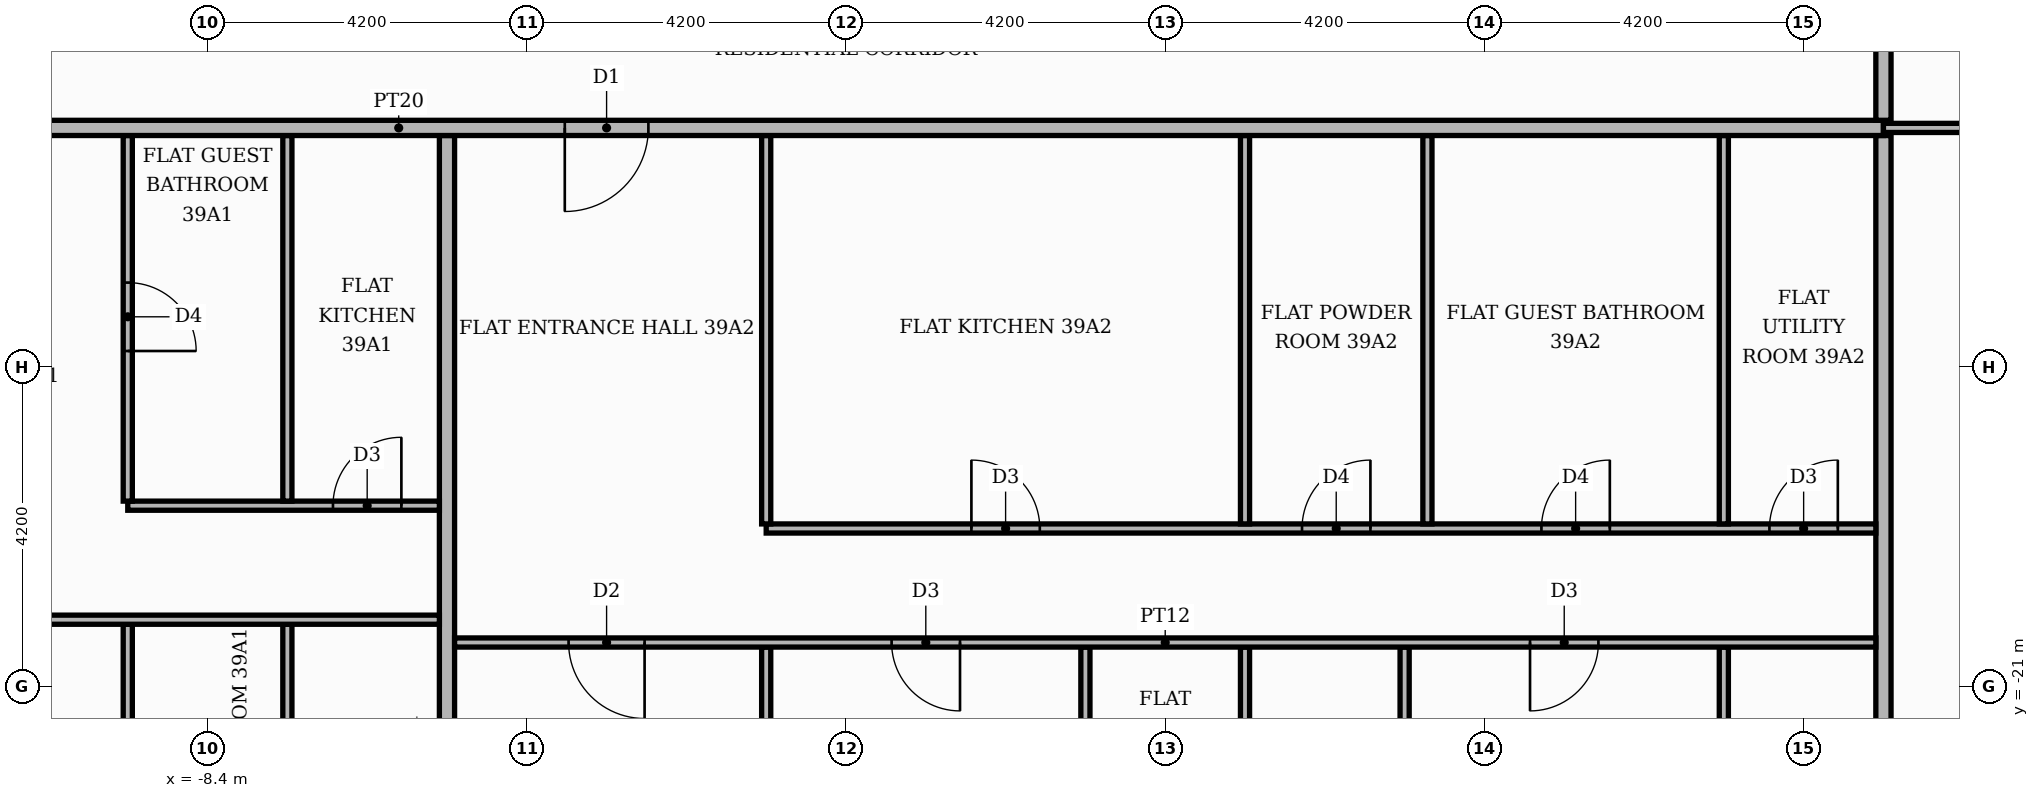
"""IFC4 building model, lengths in metres.
Left out: names, types, materials, properties, quantities, classifications, styles, units other than length and angle.
Written with IfcOpenShell. Run it as: python <this file> out.ifc"""

import sys

from ifc_helpers import new_model, si_unit, direction, frame, frame_2d, origin, place, context, subcontext, project, spatial, rectangle, extrude, element, fill, save


model = new_model("IFC4")
c1 = context("Model", 3, precision=1e-05, world=origin(), true_north=direction((0.0, 1.0)))
c2 = subcontext(c1, "Body", "Model", "MODEL_VIEW")
j1 = project(units=[si_unit("LENGTHUNIT", "METRE"), si_unit("PLANEANGLEUNIT", "RADIAN")], contexts=[c1])
p1 = place(None, origin())
s1 = spatial("IfcSite", under=j1, at=p1, CompositionType="ELEMENT")
p2 = place(p1, origin())
s2 = spatial("IfcBuilding", under=s1, at=p2, CompositionType="ELEMENT")
p3 = place(p2, frame((0.0, 0.0, 165.0)))
s3 = spatial("IfcBuildingStorey", under=s2, at=p3, CompositionType="ELEMENT", Elevation=165.0)
p4 = place(p3, frame((-9.45, -25.42, 0.0), z_axis=(0.0, 0.0, 1.0), x_axis=(0.0, 1.0, 0.0)))
e1 = element("IfcWall", 1, at=p4, inside=s3, PredefinedType="PARTITIONING", context=c2, shape_type="SweptSolid", body=[
    extrude(rectangle(XDim=5.24, YDim=0.12, at=frame_2d((2.62, 0.0))), origin(), (0.0, 0.0, 1.0), 3.48),
])
p5 = place(p4, frame((2.05, 0.0, 0.0)))
e2 = element("IfcOpeningElement", 2, at=p5, cuts=e1, PredefinedType="OPENING", context=c2, shape_type="SweptSolid", body=[
    extrude(rectangle(XDim=0.9, YDim=2.1, at=frame_2d((0.45, 1.05))), frame((0.0, 0.07, 0.0), z_axis=(0.0, -1.0, 0.0), x_axis=(1.0, 0.0, 0.0)), (0.0, 0.0, 1.0), 0.14),
])
p6 = place(p3, frame((-7.35, -25.42, 0.0), z_axis=(0.0, 0.0, 1.0), x_axis=(0.0, 1.0, 0.0)))
e3 = element("IfcWall", 3, at=p6, inside=s3, PredefinedType="PARTITIONING", context=c2, shape_type="SweptSolid", body=[
    extrude(rectangle(XDim=5.24, YDim=0.12, at=frame_2d((2.62, 0.0))), origin(), (0.0, 0.0, 1.0), 3.48),
])
p7 = place(p6, frame((2.05, 0.0, 0.0)))
e4 = element("IfcOpeningElement", 4, at=p7, cuts=e3, PredefinedType="OPENING", context=c2, shape_type="SweptSolid", body=[
    extrude(rectangle(XDim=0.9, YDim=2.1, at=frame_2d((0.45, 1.05))), frame((0.0, 0.07, 0.0), z_axis=(0.0, -1.0, 0.0), x_axis=(1.0, 0.0, 0.0)), (0.0, 0.0, 1.0), 0.14),
])
p8 = place(p3, frame((-5.25, -25.42, 0.0), z_axis=(0.0, 0.0, 1.0), x_axis=(0.0, 1.0, 0.0)))
e5 = element("IfcWall", 5, at=p8, inside=s3, PredefinedType="PARTITIONING", context=c2, shape_type="SweptSolid", body=[
    extrude(rectangle(XDim=11.67, YDim=0.2, at=frame_2d((5.835, 0.0))), origin(), (0.0, 0.0, 1.0), 3.48),
])
p9 = place(p3, frame((-1.05, -25.42, 0.0), z_axis=(0.0, 0.0, 1.0), x_axis=(0.0, 1.0, 0.0)))
e6 = element("IfcWall", 6, at=p9, inside=s3, PredefinedType="PARTITIONING", context=c2, shape_type="SweptSolid", body=[
    extrude(rectangle(XDim=4.94, YDim=0.12, at=frame_2d((2.47, 0.0))), origin(), (0.0, 0.0, 1.0), 3.48),
])
p10 = place(p3, frame((3.15, -25.42, 0.0), z_axis=(0.0, 0.0, 1.0), x_axis=(0.0, 1.0, 0.0)))
e7 = element("IfcWall", 7, at=p10, inside=s3, PredefinedType="PARTITIONING", context=c2, shape_type="SweptSolid", body=[
    extrude(rectangle(XDim=4.94, YDim=0.12, at=frame_2d((2.47, 0.0))), origin(), (0.0, 0.0, 1.0), 3.48),
])
p11 = place(p10, frame((1.9, 0.0, 0.0)))
e8 = element("IfcOpeningElement", 8, at=p11, cuts=e7, PredefinedType="OPENING", context=c2, shape_type="SweptSolid", body=[
    extrude(rectangle(XDim=0.9, YDim=2.1, at=frame_2d((0.45, 1.05))), frame((0.0, 0.07, 0.0), z_axis=(0.0, -1.0, 0.0), x_axis=(1.0, 0.0, 0.0)), (0.0, 0.0, 1.0), 0.14),
])
p12 = place(p3, frame((5.25, -25.42, 0.0), z_axis=(0.0, 0.0, 1.0), x_axis=(0.0, 1.0, 0.0)))
e9 = element("IfcWall", 9, at=p12, inside=s3, PredefinedType="PARTITIONING", context=c2, shape_type="SweptSolid", body=[
    extrude(rectangle(XDim=4.94, YDim=0.12, at=frame_2d((2.47, 0.0))), origin(), (0.0, 0.0, 1.0), 3.48),
])
p13 = place(p12, frame((1.9, 0.0, 0.0)))
e10 = element("IfcOpeningElement", 10, at=p13, cuts=e9, PredefinedType="OPENING", context=c2, shape_type="SweptSolid", body=[
    extrude(rectangle(XDim=0.9, YDim=2.1, at=frame_2d((0.45, 1.05))), frame((0.0, 0.07, 0.0), z_axis=(0.0, -1.0, 0.0), x_axis=(1.0, 0.0, 0.0)), (0.0, 0.0, 1.0), 0.14),
])
p14 = place(p3, frame((7.35, -25.42, 0.0), z_axis=(0.0, 0.0, 1.0), x_axis=(0.0, 1.0, 0.0)))
e11 = element("IfcWall", 11, at=p14, inside=s3, PredefinedType="PARTITIONING", context=c2, shape_type="SweptSolid", body=[
    extrude(rectangle(XDim=4.94, YDim=0.12, at=frame_2d((2.47, 0.0))), origin(), (0.0, 0.0, 1.0), 3.48),
])
p15 = place(p3, frame((11.55, -25.42, 0.0), z_axis=(0.0, 0.0, 1.0), x_axis=(0.0, 1.0, 0.0)))
e12 = element("IfcWall", 12, at=p15, inside=s3, PredefinedType="PARTITIONING", context=c2, shape_type="SweptSolid", body=[
    extrude(rectangle(XDim=4.94, YDim=0.12, at=frame_2d((2.47, 0.0))), origin(), (0.0, 0.0, 1.0), 3.48),
])
p16 = place(p15, frame((1.9, 0.0, 0.0)))
e13 = element("IfcOpeningElement", 13, at=p16, cuts=e12, PredefinedType="OPENING", context=c2, shape_type="SweptSolid", body=[
    extrude(rectangle(XDim=0.9, YDim=2.1, at=frame_2d((0.45, 1.05))), frame((0.0, 0.07, 0.0), z_axis=(0.0, -1.0, 0.0), x_axis=(1.0, 0.0, 0.0)), (0.0, 0.0, 1.0), 0.14),
])
p17 = place(p3, frame((13.65, -25.42, 0.0), z_axis=(0.0, 0.0, 1.0), x_axis=(0.0, 1.0, 0.0)))
e14 = element("IfcWall", 14, at=p17, inside=s3, PredefinedType="PARTITIONING", context=c2, shape_type="SweptSolid", body=[
    extrude(rectangle(XDim=11.67, YDim=0.2, at=frame_2d((5.835, 0.0))), origin(), (0.0, 0.0, 1.0), 3.48),
])
p18 = place(p3, frame((-5.15, -20.42, 0.0), z_axis=(0.0, 0.0, 1.0), x_axis=(1.0, 0.0, 0.0)))
e15 = element("IfcWall", 15, at=p18, inside=s3, PredefinedType="PARTITIONING", context=c2, shape_type="SweptSolid", body=[
    extrude(rectangle(XDim=18.7, YDim=0.12, at=frame_2d((9.35, 0.0))), origin(), (0.0, 0.0, 1.0), 3.48),
])
p19 = place(p18, frame((1.5, 0.0, 0.0)))
e16 = element("IfcOpeningElement", 16, at=p19, cuts=e15, PredefinedType="OPENING", context=c2, shape_type="SweptSolid", body=[
    extrude(rectangle(XDim=1.0, YDim=2.1, at=frame_2d((0.5, 1.05))), frame((0.0, 0.07, 0.0), z_axis=(0.0, -1.0, 0.0), x_axis=(1.0, 0.0, 0.0)), (0.0, 0.0, 1.0), 0.14),
])
p20 = place(p18, frame((5.75, 0.0, 0.0)))
e17 = element("IfcOpeningElement", 17, at=p20, cuts=e15, PredefinedType="OPENING", context=c2, shape_type="SweptSolid", body=[
    extrude(rectangle(XDim=0.9, YDim=2.1, at=frame_2d((0.45, 1.05))), frame((0.0, 0.07, 0.0), z_axis=(0.0, -1.0, 0.0), x_axis=(1.0, 0.0, 0.0)), (0.0, 0.0, 1.0), 0.14),
])
p21 = place(p18, frame((14.15, 0.0, 0.0)))
e18 = element("IfcOpeningElement", 18, at=p21, cuts=e15, PredefinedType="OPENING", context=c2, shape_type="SweptSolid", body=[
    extrude(rectangle(XDim=0.9, YDim=2.1, at=frame_2d((0.45, 1.05))), frame((0.0, 0.07, 0.0), z_axis=(0.0, -1.0, 0.0), x_axis=(1.0, 0.0, 0.0)), (0.0, 0.0, 1.0), 0.14),
])
p22 = place(p3, frame((-25.42, -20.12, 0.0), z_axis=(0.0, 0.0, 1.0), x_axis=(1.0, 0.0, 0.0)))
e19 = element("IfcWall", 19, at=p22, inside=s3, PredefinedType="PARTITIONING", context=c2, shape_type="SweptSolid", body=[
    extrude(rectangle(XDim=20.07, YDim=0.12, at=frame_2d((10.035, 0.0))), origin(), (0.0, 0.0, 1.0), 3.48),
])
p23 = place(p22, frame((10.22, 0.0, 0.0)))
e20 = element("IfcOpeningElement", 20, at=p23, cuts=e19, PredefinedType="OPENING", context=c2, shape_type="SweptSolid", body=[
    extrude(rectangle(XDim=1.0, YDim=2.1, at=frame_2d((0.5, 1.05))), frame((0.0, 0.07, 0.0), z_axis=(0.0, -1.0, 0.0), x_axis=(1.0, 0.0, 0.0)), (0.0, 0.0, 1.0), 0.14),
])
p24 = place(p22, frame((13.42, 0.0, 0.0)))
e21 = element("IfcOpeningElement", 21, at=p24, cuts=e19, PredefinedType="OPENING", context=c2, shape_type="SweptSolid", body=[
    extrude(rectangle(XDim=0.9, YDim=2.1, at=frame_2d((0.45, 1.05))), frame((0.0, 0.07, 0.0), z_axis=(0.0, -1.0, 0.0), x_axis=(1.0, 0.0, 0.0)), (0.0, 0.0, 1.0), 0.14),
])
p25 = place(p3, frame((-1.05, -18.92, 0.0), z_axis=(0.0, 0.0, 1.0), x_axis=(1.0, 0.0, 0.0)))
e22 = element("IfcWall", 22, at=p25, inside=s3, PredefinedType="PARTITIONING", context=c2, shape_type="SweptSolid", body=[
    extrude(rectangle(XDim=14.6, YDim=0.12, at=frame_2d((7.3, 0.0))), origin(), (0.0, 0.0, 1.0), 3.48),
])
p26 = place(p25, frame((2.7, 0.0, 0.0)))
e23 = element("IfcOpeningElement", 23, at=p26, cuts=e22, PredefinedType="OPENING", context=c2, shape_type="SweptSolid", body=[
    extrude(rectangle(XDim=0.9, YDim=2.1, at=frame_2d((0.45, 1.05))), frame((0.0, 0.07, 0.0), z_axis=(0.0, -1.0, 0.0), x_axis=(1.0, 0.0, 0.0)), (0.0, 0.0, 1.0), 0.14),
])
p27 = place(p25, frame((7.05, 0.0, 0.0)))
e24 = element("IfcOpeningElement", 24, at=p27, cuts=e22, PredefinedType="OPENING", context=c2, shape_type="SweptSolid", body=[
    extrude(rectangle(XDim=0.9, YDim=2.1, at=frame_2d((0.45, 1.05))), frame((0.0, 0.07, 0.0), z_axis=(0.0, -1.0, 0.0), x_axis=(1.0, 0.0, 0.0)), (0.0, 0.0, 1.0), 0.14),
])
p28 = place(p25, frame((10.2, 0.0, 0.0)))
e25 = element("IfcOpeningElement", 25, at=p28, cuts=e22, PredefinedType="OPENING", context=c2, shape_type="SweptSolid", body=[
    extrude(rectangle(XDim=0.9, YDim=2.1, at=frame_2d((0.45, 1.05))), frame((0.0, 0.07, 0.0), z_axis=(0.0, -1.0, 0.0), x_axis=(1.0, 0.0, 0.0)), (0.0, 0.0, 1.0), 0.14),
])
p29 = place(p25, frame((13.2, 0.0, 0.0)))
e26 = element("IfcOpeningElement", 26, at=p29, cuts=e22, PredefinedType="OPENING", context=c2, shape_type="SweptSolid", body=[
    extrude(rectangle(XDim=0.9, YDim=2.1, at=frame_2d((0.45, 1.05))), frame((0.0, 0.07, 0.0), z_axis=(0.0, -1.0, 0.0), x_axis=(1.0, 0.0, 0.0)), (0.0, 0.0, 1.0), 0.14),
])
for number, where, z_axis, x_axis in (
    (27, (-1.05, -18.86, 0.0), (0.0, 0.0, 1.0), (0.0, 1.0, 0.0)),
    (28, (5.25, -18.86, 0.0), (0.0, 0.0, 1.0), (0.0, 1.0, 0.0)),
    (29, (7.65, -18.86, 0.0), (0.0, 0.0, 1.0), (0.0, 1.0, 0.0)),
    (30, (11.55, -18.86, 0.0), (0.0, 0.0, 1.0), (0.0, 1.0, 0.0)),
):
    element("IfcWall", number, at=place(p3, frame(where, z_axis=z_axis, x_axis=x_axis)), inside=s3, PredefinedType="PARTITIONING", context=c2, shape_type="SweptSolid", body=[
        extrude(rectangle(XDim=5.11, YDim=0.12, at=frame_2d((2.555, 0.0))), origin(), (0.0, 0.0, 1.0), 3.48),
    ])
p30 = place(p3, frame((-9.45, -18.62, 0.0), z_axis=(0.0, 0.0, 1.0), x_axis=(1.0, 0.0, 0.0)))
e31 = element("IfcWall", 31, at=p30, inside=s3, PredefinedType="PARTITIONING", context=c2, shape_type="SweptSolid", body=[
    extrude(rectangle(XDim=4.1, YDim=0.12, at=frame_2d((2.05, 0.0))), origin(), (0.0, 0.0, 1.0), 3.48),
])
p31 = place(p30, frame((2.7, 0.0, 0.0)))
e32 = element("IfcOpeningElement", 32, at=p31, cuts=e31, PredefinedType="OPENING", context=c2, shape_type="SweptSolid", body=[
    extrude(rectangle(XDim=0.9, YDim=2.1, at=frame_2d((0.45, 1.05))), frame((0.0, 0.07, 0.0), z_axis=(0.0, -1.0, 0.0), x_axis=(1.0, 0.0, 0.0)), (0.0, 0.0, 1.0), 0.14),
])
p32 = place(p3, frame((-9.45, -18.56, 0.0), z_axis=(0.0, 0.0, 1.0), x_axis=(0.0, 1.0, 0.0)))
e33 = element("IfcWall", 33, at=p32, inside=s3, PredefinedType="PARTITIONING", context=c2, shape_type="SweptSolid", body=[
    extrude(rectangle(XDim=4.81, YDim=0.12, at=frame_2d((2.405, 0.0))), origin(), (0.0, 0.0, 1.0), 3.48),
])
p33 = place(p32, frame((1.975, 0.0, 0.0)))
e34 = element("IfcOpeningElement", 34, at=p33, cuts=e33, PredefinedType="OPENING", context=c2, shape_type="SweptSolid", body=[
    extrude(rectangle(XDim=0.9, YDim=2.1, at=frame_2d((0.45, 1.05))), frame((0.0, 0.07, 0.0), z_axis=(0.0, -1.0, 0.0), x_axis=(1.0, 0.0, 0.0)), (0.0, 0.0, 1.0), 0.14),
])
p34 = place(p3, frame((-7.35, -18.56, 0.0), z_axis=(0.0, 0.0, 1.0), x_axis=(0.0, 1.0, 0.0)))
e35 = element("IfcWall", 35, at=p34, inside=s3, PredefinedType="PARTITIONING", context=c2, shape_type="SweptSolid", body=[
    extrude(rectangle(XDim=4.81, YDim=0.12, at=frame_2d((2.405, 0.0))), origin(), (0.0, 0.0, 1.0), 3.48),
])
p35 = place(p3, frame((-25.42, -13.65, 0.0), z_axis=(0.0, 0.0, 1.0), x_axis=(1.0, 0.0, 0.0)))
e36 = element("IfcWall", 36, at=p35, inside=s3, PredefinedType="PARTITIONING", context=c2, shape_type="SweptSolid", body=[
    extrude(rectangle(XDim=39.07, YDim=0.2, at=frame_2d((19.535, 0.0))), origin(), (0.0, 0.0, 1.0), 3.48),
])
p36 = place(p35, frame((13.32, 0.0, 0.0)))
e37 = element("IfcOpeningElement", 37, at=p36, cuts=e36, PredefinedType="OPENING", context=c2, shape_type="SweptSolid", body=[
    extrude(rectangle(XDim=1.1, YDim=2.4, at=frame_2d((0.55, 1.2))), frame((0.0, 0.11, 0.0), z_axis=(0.0, -1.0, 0.0), x_axis=(1.0, 0.0, 0.0)), (0.0, 0.0, 1.0), 0.22),
])
p37 = place(p35, frame((21.72, 0.0, 0.0)))
e38 = element("IfcOpeningElement", 38, at=p37, cuts=e36, PredefinedType="OPENING", context=c2, shape_type="SweptSolid", body=[
    extrude(rectangle(XDim=1.1, YDim=2.4, at=frame_2d((0.55, 1.2))), frame((0.0, 0.11, 0.0), z_axis=(0.0, -1.0, 0.0), x_axis=(1.0, 0.0, 0.0)), (0.0, 0.0, 1.0), 0.22),
])
p38 = place(p3, frame((13.65, -13.65, 0.0), z_axis=(0.0, 0.0, 1.0), x_axis=(1.0, 0.0, 0.0)))
e39 = element("IfcWall", 39, at=p38, inside=s3, PredefinedType="PARTITIONING", context=c2, shape_type="SweptSolid", body=[
    extrude(rectangle(XDim=7.07, YDim=0.12, at=frame_2d((3.535, 0.0))), origin(), (0.0, 0.0, 1.0), 3.48),
])
p39 = place(p38, frame((3.085, 0.0, 0.0)))
e40 = element("IfcOpeningElement", 40, at=p39, cuts=e39, PredefinedType="OPENING", context=c2, shape_type="SweptSolid", body=[
    extrude(rectangle(XDim=0.9, YDim=2.1, at=frame_2d((0.45, 1.05))), frame((0.0, 0.07, 0.0), z_axis=(0.0, -1.0, 0.0), x_axis=(1.0, 0.0, 0.0)), (0.0, 0.0, 1.0), 0.14),
])
p40 = place(p3, frame((13.65, -13.55, 0.0), z_axis=(0.0, 0.0, 1.0), x_axis=(0.0, 1.0, 0.0)))
e41 = element("IfcWall", 41, at=p40, inside=s3, PredefinedType="PARTITIONING", context=c2, shape_type="SweptSolid", body=[
    extrude(rectangle(XDim=2.45, YDim=0.2, at=frame_2d((1.225, 0.0))), origin(), (0.0, 0.0, 1.0), 3.48),
])
p41 = place(p33, frame((0.9, 0.0, 0.0), z_axis=(0.0, 0.0, 1.0), x_axis=(-1.0, 0.0, 0.0)))
e42 = element("IfcDoor", 42, at=p41, inside=s3, OperationType="SINGLE_SWING_LEFT", PredefinedType="DOOR", context=c2, shape_type="SweptSolid", body=[
    extrude(rectangle(XDim=0.9, YDim=2.1, at=frame_2d((0.45, 1.05))), frame((0.0, 0.025, 0.0), z_axis=(0.0, -1.0, 0.0), x_axis=(1.0, 0.0, 0.0)), (0.0, 0.0, 1.0), 0.05),
])
fill(e34, e42)
p42 = place(p31, origin())
e43 = element("IfcDoor", 43, at=p42, inside=s3, OperationType="SINGLE_SWING_RIGHT", PredefinedType="DOOR", context=c2, shape_type="SweptSolid", body=[
    extrude(rectangle(XDim=0.9, YDim=2.1, at=frame_2d((0.45, 1.05))), frame((0.0, 0.025, 0.0), z_axis=(0.0, -1.0, 0.0), x_axis=(1.0, 0.0, 0.0)), (0.0, 0.0, 1.0), 0.05),
])
fill(e32, e43)
p43 = place(p37, frame((1.1, 0.0, 0.0), z_axis=(0.0, 0.0, 1.0), x_axis=(-1.0, 0.0, 0.0)))
e44 = element("IfcDoor", 44, at=p43, inside=s3, OperationType="SINGLE_SWING_LEFT", PredefinedType="DOOR", context=c2, shape_type="SweptSolid", body=[
    extrude(rectangle(XDim=1.1, YDim=2.4, at=frame_2d((0.55, 1.2))), frame((0.0, 0.025, 0.0), z_axis=(0.0, -1.0, 0.0), x_axis=(1.0, 0.0, 0.0)), (0.0, 0.0, 1.0), 0.05),
])
fill(e38, e44)
p44 = place(p26, origin())
e45 = element("IfcDoor", 45, at=p44, inside=s3, OperationType="SINGLE_SWING_LEFT", PredefinedType="DOOR", context=c2, shape_type="SweptSolid", body=[
    extrude(rectangle(XDim=0.9, YDim=2.1, at=frame_2d((0.45, 1.05))), frame((0.0, 0.025, 0.0), z_axis=(0.0, -1.0, 0.0), x_axis=(1.0, 0.0, 0.0)), (0.0, 0.0, 1.0), 0.05),
])
fill(e23, e45)
p45 = place(p27, origin())
e46 = element("IfcDoor", 46, at=p45, inside=s3, OperationType="SINGLE_SWING_RIGHT", PredefinedType="DOOR", context=c2, shape_type="SweptSolid", body=[
    extrude(rectangle(XDim=0.9, YDim=2.1, at=frame_2d((0.45, 1.05))), frame((0.0, 0.025, 0.0), z_axis=(0.0, -1.0, 0.0), x_axis=(1.0, 0.0, 0.0)), (0.0, 0.0, 1.0), 0.05),
])
fill(e24, e46)
p46 = place(p28, origin())
e47 = element("IfcDoor", 47, at=p46, inside=s3, OperationType="SINGLE_SWING_RIGHT", PredefinedType="DOOR", context=c2, shape_type="SweptSolid", body=[
    extrude(rectangle(XDim=0.9, YDim=2.1, at=frame_2d((0.45, 1.05))), frame((0.0, 0.025, 0.0), z_axis=(0.0, -1.0, 0.0), x_axis=(1.0, 0.0, 0.0)), (0.0, 0.0, 1.0), 0.05),
])
fill(e25, e47)
p47 = place(p29, origin())
e48 = element("IfcDoor", 48, at=p47, inside=s3, OperationType="SINGLE_SWING_RIGHT", PredefinedType="DOOR", context=c2, shape_type="SweptSolid", body=[
    extrude(rectangle(XDim=0.9, YDim=2.1, at=frame_2d((0.45, 1.05))), frame((0.0, 0.025, 0.0), z_axis=(0.0, -1.0, 0.0), x_axis=(1.0, 0.0, 0.0)), (0.0, 0.0, 1.0), 0.05),
])
fill(e26, e48)
p48 = place(p19, frame((1.0, 0.0, 0.0), z_axis=(0.0, 0.0, 1.0), x_axis=(-1.0, 0.0, 0.0)))
e49 = element("IfcDoor", 49, at=p48, inside=s3, OperationType="SINGLE_SWING_RIGHT", PredefinedType="DOOR", context=c2, shape_type="SweptSolid", body=[
    extrude(rectangle(XDim=1.0, YDim=2.1, at=frame_2d((0.5, 1.05))), frame((0.0, 0.025, 0.0), z_axis=(0.0, -1.0, 0.0), x_axis=(1.0, 0.0, 0.0)), (0.0, 0.0, 1.0), 0.05),
])
fill(e16, e49)
p49 = place(p20, frame((0.9, 0.0, 0.0), z_axis=(0.0, 0.0, 1.0), x_axis=(-1.0, 0.0, 0.0)))
e50 = element("IfcDoor", 50, at=p49, inside=s3, OperationType="SINGLE_SWING_RIGHT", PredefinedType="DOOR", context=c2, shape_type="SweptSolid", body=[
    extrude(rectangle(XDim=0.9, YDim=2.1, at=frame_2d((0.45, 1.05))), frame((0.0, 0.025, 0.0), z_axis=(0.0, -1.0, 0.0), x_axis=(1.0, 0.0, 0.0)), (0.0, 0.0, 1.0), 0.05),
])
fill(e17, e50)
p50 = place(p21, frame((0.9, 0.0, 0.0), z_axis=(0.0, 0.0, 1.0), x_axis=(-1.0, 0.0, 0.0)))
e51 = element("IfcDoor", 51, at=p50, inside=s3, OperationType="SINGLE_SWING_LEFT", PredefinedType="DOOR", context=c2, shape_type="SweptSolid", body=[
    extrude(rectangle(XDim=0.9, YDim=2.1, at=frame_2d((0.45, 1.05))), frame((0.0, 0.025, 0.0), z_axis=(0.0, -1.0, 0.0), x_axis=(1.0, 0.0, 0.0)), (0.0, 0.0, 1.0), 0.05),
])
fill(e18, e51)
save(model, sys.argv[1])
